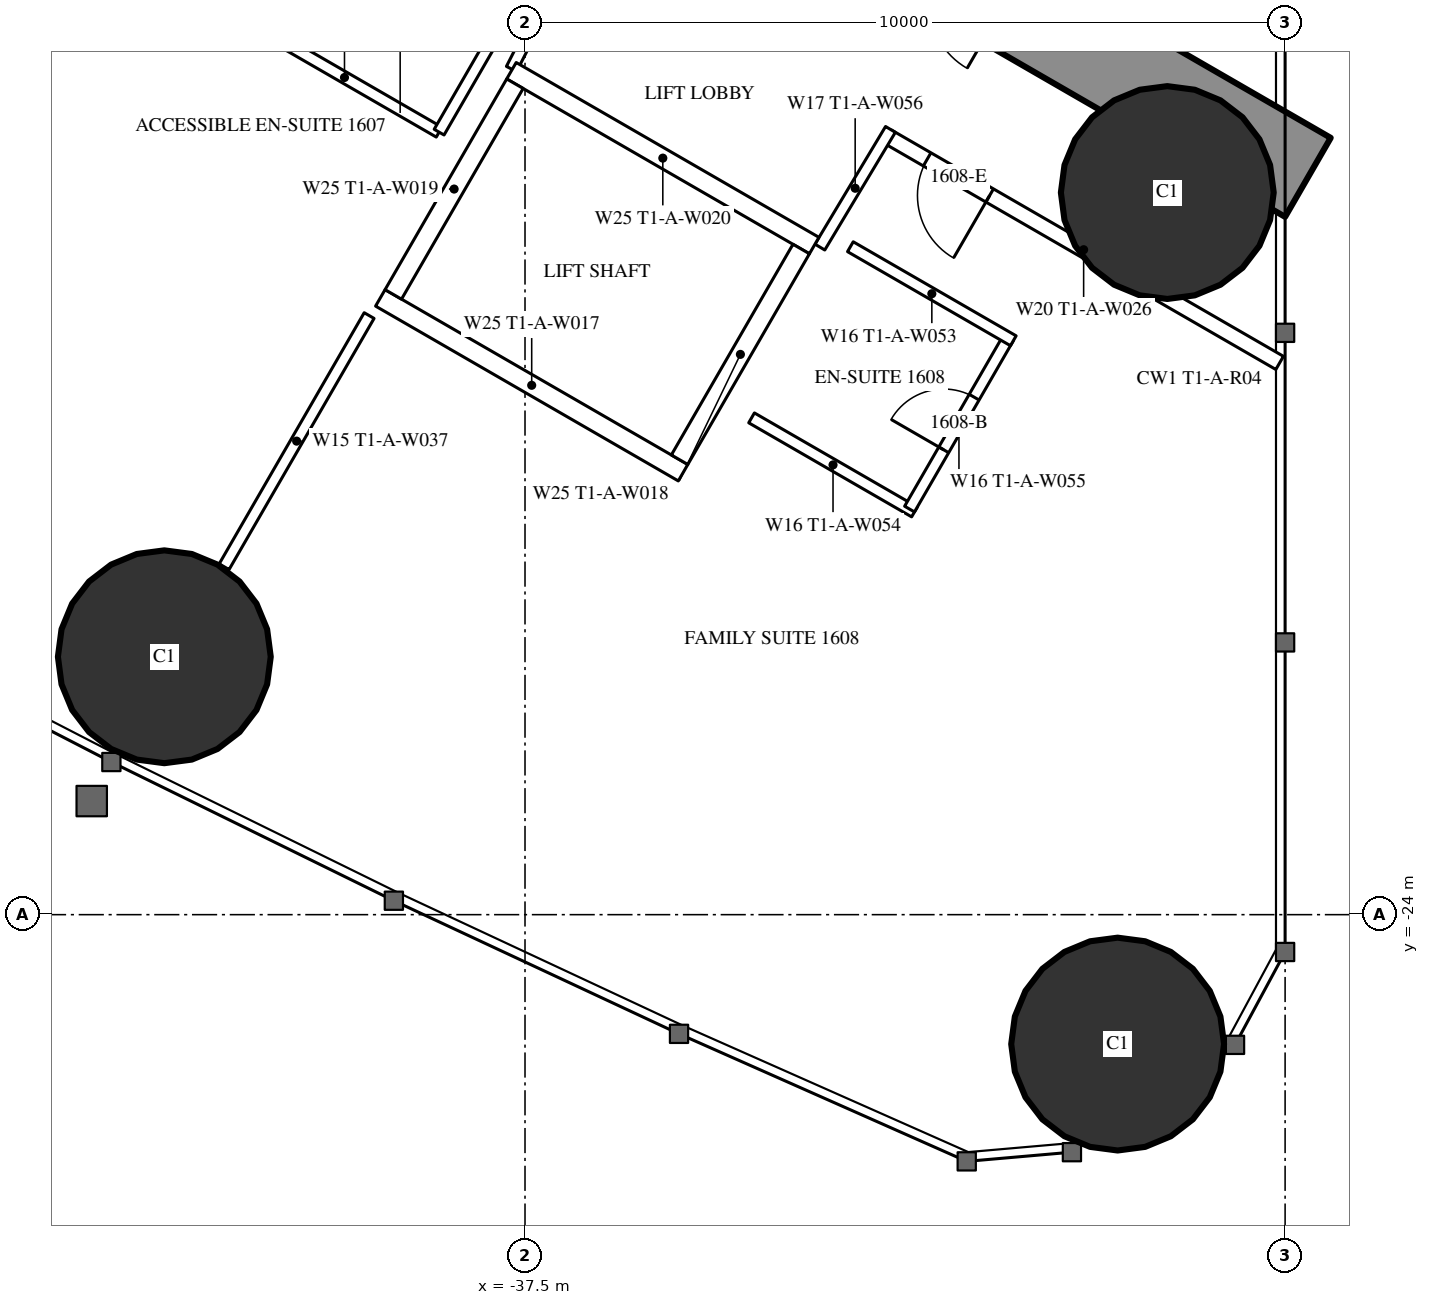
"""IFC4 building model, lengths in metres.
Left out: names, types, materials, properties, quantities, classifications, styles, units other than length and angle.
Written with IfcOpenShell. Run it as: python <this file> out.ifc"""

import sys

from ifc_helpers import new_model, si_unit, direction, frame, frame_2d, origin, origin_2d, place, context, subcontext, project, spatial, rectangle, hollow_circle, extrude, element, fill, save


model = new_model("IFC4")
c1 = context("Model", 3, precision=1e-05, world=origin(), true_north=direction((0.0, 1.0)))
c2 = subcontext(c1, "Body", "Model", "MODEL_VIEW")
j1 = project(units=[si_unit("LENGTHUNIT", "METRE"), si_unit("PLANEANGLEUNIT", "RADIAN")], contexts=[c1])
p1 = place(None, origin())
s1 = spatial("IfcSite", under=j1, at=p1, CompositionType="ELEMENT")
p2 = place(p1, origin())
s2 = spatial("IfcBuilding", under=s1, at=p2, CompositionType="ELEMENT")
p3 = place(p2, frame((0.0, 0.0, 63.5)))
s3 = spatial("IfcBuildingStorey", under=s2, at=p3, CompositionType="ELEMENT", Elevation=63.5)
for number, where, z_axis, x_axis in (
    (1, (-29.703, -25.703, 0.0), (0.0, 0.0, 1.0), (1.0, 0.0, 0.0)),
    (2, (-29.05, -14.5, 0.0), (0.0, 0.0, 1.0), (1.0, 0.0, 0.0)),
    (3, (-42.245, -20.607, 0.0), (0.0, 0.0, 1.0), (1.0, 0.0, 0.0)),
):
    element("IfcColumn", number, at=place(p3, frame(where, z_axis=z_axis, x_axis=x_axis)), inside=s3, PredefinedType="COLUMN", context=c2, shape_type="SweptSolid", body=[
        extrude(hollow_circle(Radius=1.4, WallThickness=0.12, at=origin_2d()), origin(), (0.0, 0.0, 1.0), 3.5),
    ])
p4 = place(p3, frame((-27.2, -14.3, 0.0), z_axis=(0.0, 0.0, 1.0), x_axis=(-0.866024021859, 0.500002393557, 0.0)))
e4 = element("IfcWall", 4, at=p4, inside=s3, PredefinedType="SHEAR", context=c2, shape_type="SweptSolid", body=[
    extrude(rectangle(XDim=27.907, YDim=1.2, at=frame_2d((13.954, 0.0))), origin(), (0.0, 0.0, 1.0), 3.5),
])
p5 = place(p4, frame((4.6, 0.0, 0.0)))
e5 = element("IfcOpeningElement", 5, at=p5, cuts=e4, PredefinedType="OPENING", context=c2, shape_type="SweptSolid", body=[
    extrude(rectangle(XDim=1.0, YDim=2.2, at=frame_2d((0.5, 1.1))), frame((0.0, 0.61, 0.0), z_axis=(0.0, -1.0, 0.0), x_axis=(1.0, 0.0, 0.0)), (0.0, 0.0, 1.0), 1.22),
])
p6 = place(p4, frame((13.395, 0.0, 0.0)))
e6 = element("IfcOpeningElement", 6, at=p6, cuts=e4, PredefinedType="OPENING", context=c2, shape_type="SweptSolid", body=[
    extrude(rectangle(XDim=1.8, YDim=2.2, at=frame_2d((0.9, 1.1))), frame((0.0, 0.61, 0.0), z_axis=(0.0, -1.0, 0.0), x_axis=(1.0, 0.0, 0.0)), (0.0, 0.0, 1.0), 1.22),
])
p7 = place(p3, frame((-39.551, -16.118, 0.0), z_axis=(0.0, 0.0, 1.0), x_axis=(-0.499986503906, -0.866033195618, 0.0)))
e7 = element("IfcWall", 7, at=p7, inside=s3, PredefinedType="PARTITIONING", context=c2, shape_type="SweptSolid", body=[
    extrude(rectangle(XDim=3.815, YDim=0.15, at=frame_2d((1.907, 0.0))), origin(), (0.0, 0.0, 1.0), 3.25),
])
p8 = place(p3, frame((-27.572, -16.741, 0.0), z_axis=(0.0, 0.0, 1.0), x_axis=(-0.866024464444, 0.500001626982, 0.0)))
e8 = element("IfcWall", 8, at=p8, inside=s3, PredefinedType="PARTITIONING", context=c2, shape_type="SweptSolid", body=[
    extrude(rectangle(XDim=5.955, YDim=0.2, at=frame_2d((2.978, 0.0))), origin(), (0.0, 0.0, 1.0), 3.25),
])
p9 = place(p8, frame((4.405, 0.0, 0.0)))
e9 = element("IfcOpeningElement", 9, at=p9, cuts=e8, PredefinedType="OPENING", context=c2, shape_type="SweptSolid", body=[
    extrude(rectangle(XDim=0.95, YDim=2.2, at=frame_2d((0.475, 1.1))), frame((0.0, 0.11, 0.0), z_axis=(0.0, -1.0, 0.0), x_axis=(1.0, 0.0, 0.0)), (0.0, 0.0, 1.0), 0.22),
])
p10 = place(p3, frame((-36.857, -11.265, 0.0), z_axis=(0.0, 0.0, 1.0), x_axis=(-0.454225294761, -0.890886851176, 0.0)))
e10 = element("IfcWall", 10, at=p10, inside=s3, PredefinedType="PARTITIONING", context=c2, shape_type="SweptSolid", body=[
    extrude(rectangle(XDim=1.807, YDim=0.15, at=frame_2d((0.904, 0.0))), origin(), (0.0, 0.0, 1.0), 3.25),
])
p11 = place(p3, frame((-33.621, -15.218, 0.0), z_axis=(0.0, 0.0, 1.0), x_axis=(0.514336634837, 0.857588377991, 0.0)))
e11 = element("IfcWall", 11, at=p11, inside=s3, PredefinedType="PARTITIONING", context=c2, shape_type="SweptSolid", body=[
    extrude(rectangle(XDim=1.805, YDim=0.15, at=frame_2d((0.903, 0.0))), origin(), (0.0, 0.0, 1.0), 3.25),
])
p12 = place(p3, frame((-38.63, -13.705, 0.0), z_axis=(0.0, 0.0, 1.0), x_axis=(-0.866018712932, 0.500011588718, 0.0)))
e12 = element("IfcWall", 12, at=p12, inside=s3, PredefinedType="PARTITIONING", context=c2, shape_type="SweptSolid", body=[
    extrude(rectangle(XDim=2.875, YDim=0.15, at=frame_2d((1.438, 0.0))), origin(), (0.0, 0.0, 1.0), 3.25),
])
p13 = place(p3, frame((-37.23, -11.281, 0.0), z_axis=(0.0, 0.0, 1.0), x_axis=(-0.500049511043, -0.865996816683, 0.0)))
e13 = element("IfcWall", 13, at=p13, inside=s3, PredefinedType="PARTITIONING", context=c2, shape_type="SweptSolid", body=[
    extrude(rectangle(XDim=2.8, YDim=0.15, at=frame_2d((1.4, 0.0))), origin(), (0.0, 0.0, 1.0), 3.25),
])
p14 = place(p3, frame((-32.376, -18.702, 0.0), z_axis=(0.0, 0.0, 1.0), x_axis=(-0.866006523861, 0.500032699561, 0.0)))
e14 = element("IfcWall", 14, at=p14, inside=s3, PredefinedType="PARTITIONING", context=c2, shape_type="SweptSolid", body=[
    extrude(rectangle(XDim=2.475, YDim=0.15, at=frame_2d((1.237, 0.0))), origin(), (0.0, 0.0, 1.0), 3.25),
])
p15 = place(p3, frame((-31.141, -16.413, 0.0), z_axis=(0.0, 0.0, 1.0), x_axis=(-0.500006934395, -0.866021400173, 0.0)))
e15 = element("IfcWall", 15, at=p15, inside=s3, PredefinedType="PARTITIONING", context=c2, shape_type="SweptSolid", body=[
    extrude(rectangle(XDim=2.6, YDim=0.15, at=frame_2d((1.3, 0.0))), origin(), (0.0, 0.0, 1.0), 3.25),
])
p16 = place(p15, frame((0.9, 0.0, 0.0)))
e16 = element("IfcOpeningElement", 16, at=p16, cuts=e15, PredefinedType="OPENING", context=c2, shape_type="SweptSolid", body=[
    extrude(rectangle(XDim=0.8, YDim=2.2, at=frame_2d((0.4, 1.1))), frame((0.0, 0.085, 0.0), z_axis=(0.0, -1.0, 0.0), x_axis=(1.0, 0.0, 0.0)), (0.0, 0.0, 1.0), 0.17),
])
p17 = place(p3, frame((-31.076, -16.45, 0.0), z_axis=(0.0, 0.0, 1.0), x_axis=(-0.866073894602, 0.499916002032, 0.0)))
e17 = element("IfcWall", 17, at=p17, inside=s3, PredefinedType="PARTITIONING", context=c2, shape_type="SweptSolid", body=[
    extrude(rectangle(XDim=2.475, YDim=0.15, at=frame_2d((1.238, 0.0))), origin(), (0.0, 0.0, 1.0), 3.25),
])
p18 = place(p3, frame((-33.696, -15.197, 0.0), z_axis=(0.0, 0.0, 1.0), x_axis=(-0.865976953817, 0.500083908417, 0.0)))
e18 = element("IfcWall", 18, at=p18, inside=s3, PredefinedType="PARTITIONING", context=c2, shape_type="SweptSolid", body=[
    extrude(rectangle(XDim=4.599, YDim=0.25, at=frame_2d((2.3, 0.0))), origin(), (0.0, 0.0, 1.0), 3.25),
])
p19 = place(p3, frame((-35.42, -18.186, 0.0), z_axis=(0.0, 0.0, 1.0), x_axis=(-0.865990227814, 0.50006092162, 0.0)))
e19 = element("IfcWall", 19, at=p19, inside=s3, PredefinedType="PARTITIONING", context=c2, shape_type="SweptSolid", body=[
    extrude(rectangle(XDim=4.6, YDim=0.25, at=frame_2d((2.3, 0.0))), origin(), (0.0, 0.0, 1.0), 3.25),
])
p20 = place(p3, frame((-33.866, -15.243, 0.0), z_axis=(0.0, 0.0, 1.0), x_axis=(-0.499929347863, -0.866066190972, 0.0)))
e20 = element("IfcWall", 20, at=p20, inside=s3, PredefinedType="PARTITIONING", context=c2, shape_type="SweptSolid", body=[
    extrude(rectangle(XDim=3.201, YDim=0.25, at=frame_2d((1.6, 0.0))), origin(), (0.0, 0.0, 1.0), 3.25),
])
p21 = place(p3, frame((-37.633, -13.068, 0.0), z_axis=(0.0, 0.0, 1.0), x_axis=(-0.499872130319, -0.866099216793, 0.0)))
e21 = element("IfcWall", 21, at=p21, inside=s3, PredefinedType="PARTITIONING", context=c2, shape_type="SweptSolid", body=[
    extrude(rectangle(XDim=3.2, YDim=0.25, at=frame_2d((1.6, 0.0))), origin(), (0.0, 0.0, 1.0), 3.25),
])
p22 = place(p16, origin())
e22 = element("IfcDoor", 22, at=p22, inside=s3, OperationType="SINGLE_SWING_RIGHT", PredefinedType="DOOR", context=c2, shape_type="SweptSolid", body=[
    extrude(rectangle(XDim=0.8, YDim=2.2, at=frame_2d((0.4, 1.1))), frame((0.0, 0.025, 0.0), z_axis=(0.0, -1.0, 0.0), x_axis=(1.0, 0.0, 0.0)), (0.0, 0.0, 1.0), 0.05),
])
fill(e16, e22)
p23 = place(p9, origin())
e23 = element("IfcDoor", 23, at=p23, inside=s3, OperationType="SINGLE_SWING_LEFT", PredefinedType="DOOR", context=c2, shape_type="SweptSolid", body=[
    extrude(rectangle(XDim=0.95, YDim=2.2, at=frame_2d((0.475, 1.1))), frame((0.0, 0.025, 0.0), z_axis=(0.0, -1.0, 0.0), x_axis=(1.0, 0.0, 0.0)), (0.0, 0.0, 1.0), 0.05),
])
fill(e9, e23)
save(model, sys.argv[1])
